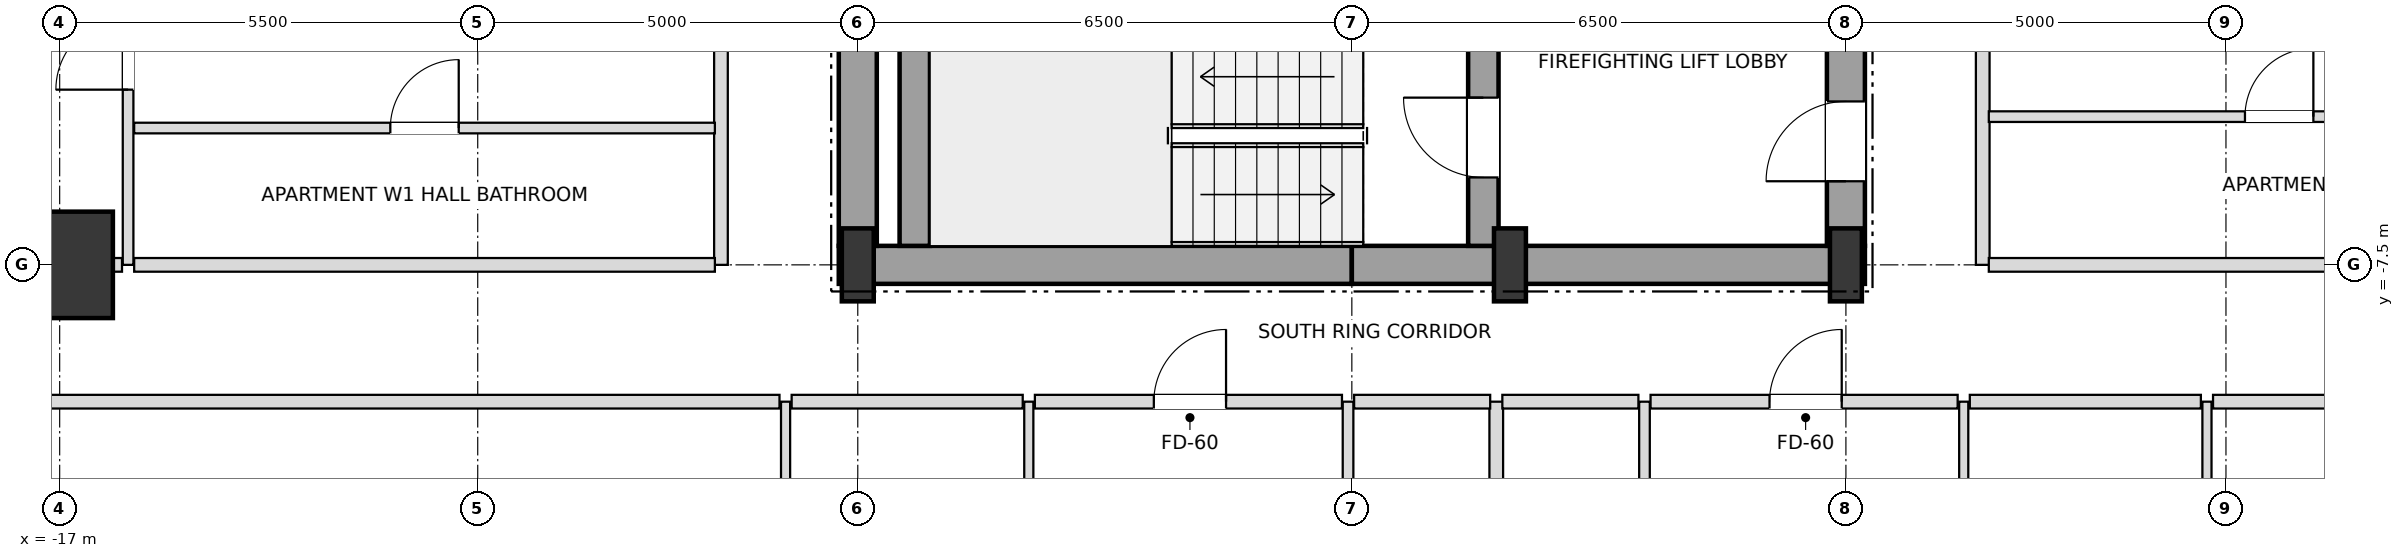
"""IFC4 building model, lengths in metres.
Left out: names, types, materials, properties, quantities, classifications, styles, units other than length and angle.
Written with IfcOpenShell. Run it as: python <this file> out.ifc"""

import sys

from ifc_helpers import new_model, si_unit, direction, frame, frame_2d, origin, origin_2d, place, context, subcontext, project, spatial, rectangle, i_section, extrude, element, fill, save


model = new_model("IFC4")
c1 = context("Model", 3, precision=1e-05, world=origin(), true_north=direction((0.0, 1.0)))
c2 = subcontext(c1, "Body", "Model", "MODEL_VIEW")
j1 = project(units=[si_unit("LENGTHUNIT", "METRE"), si_unit("PLANEANGLEUNIT", "RADIAN")], contexts=[c1])
p1 = place(None, origin())
s1 = spatial("IfcSite", under=j1, at=p1, CompositionType="ELEMENT")
p2 = place(p1, origin())
s2 = spatial("IfcBuilding", under=s1, at=p2, CompositionType="ELEMENT")
p3 = place(p2, frame((0.0, 0.0, 54.0)))
s3 = spatial("IfcBuildingStorey", under=s2, at=p3, CompositionType="ELEMENT", Elevation=54.0)
for number, where, z_axis, x_axis in (
    (1, (-6.5, -7.5, 0.0), (0.0, 0.0, 1.0), (1.0, 0.0, 0.0)),
    (2, (2.08, -7.5, 0.0), (0.0, 0.0, 1.0), (1.0, 0.0, 0.0)),
    (3, (6.5, -7.5, 0.0), (0.0, 0.0, 1.0), (1.0, 0.0, 0.0)),
):
    element("IfcColumn", number, at=place(p3, frame(where, z_axis=z_axis, x_axis=x_axis)), inside=s3, PredefinedType="COLUMN", context=c2, shape_type="SweptSolid", body=[
        extrude(i_section(OverallWidth=0.42, OverallDepth=0.96, WebThickness=0.022, FlangeThickness=0.034, at=origin_2d()), origin(), (0.0, 0.0, 1.0), 3.6),
    ])
p4 = place(p3, frame((-17.0, -7.5, 0.0), z_axis=(0.0, 0.0, 1.0), x_axis=(1.0, 0.0, 0.0)))
e4 = element("IfcColumn", 4, at=p4, inside=s3, PredefinedType="USERDEFINED", context=c2, shape_type="SweptSolid", body=[
    extrude(rectangle(XDim=1.4, YDim=1.4, at=origin_2d()), origin(), (0.0, 0.0, 1.0), 3.6),
])
for number, where, z_axis, x_axis in (
    (5, (-6.75, -7.5, 0.0), (0.0, 0.0, 1.0), (1.0, 0.0, 0.0)),
    (6, (0.0, -7.5, 0.0), (0.0, 0.0, 1.0), (1.0, 0.0, 0.0)),
):
    element("IfcWall", number, at=place(p3, frame(where, z_axis=z_axis, x_axis=x_axis)), inside=s3, PredefinedType="SHEAR", context=c2, shape_type="SweptSolid", body=[
        extrude(rectangle(XDim=6.75, YDim=0.5, at=frame_2d((3.375, 0.0))), origin(), (0.0, 0.0, 1.0), 3.38),
    ])
p5 = place(p3, frame((-6.5, -7.25, 0.0), z_axis=(0.0, 0.0, 1.0), x_axis=(0.0, 1.0, 0.0)))
e7 = element("IfcWall", 7, at=p5, inside=s3, PredefinedType="SHEAR", context=c2, shape_type="SweptSolid", body=[
    extrude(rectangle(XDim=3.55, YDim=0.5, at=frame_2d((1.775, 0.0))), origin(), (0.0, 0.0, 1.0), 3.38),
])
p6 = place(p3, frame((6.5, -7.25, 0.0), z_axis=(0.0, 0.0, 1.0), x_axis=(0.0, 1.0, 0.0)))
e8 = element("IfcWall", 8, at=p6, inside=s3, PredefinedType="SHEAR", context=c2, shape_type="SweptSolid", body=[
    extrude(rectangle(XDim=5.75, YDim=0.5, at=frame_2d((2.875, 0.0))), origin(), (0.0, 0.0, 1.0), 3.38),
])
p7 = place(p6, frame((0.85, 0.0, 0.0)))
e9 = element("IfcOpeningElement", 9, at=p7, cuts=e8, PredefinedType="OPENING", context=c2, shape_type="SweptSolid", body=[
    extrude(rectangle(XDim=1.05, YDim=2.15, at=frame_2d((0.525, 1.075))), frame((0.0, 0.26, 0.0), z_axis=(0.0, -1.0, 0.0), x_axis=(1.0, 0.0, 0.0)), (0.0, 0.0, 1.0), 0.52),
])
p8 = place(p3, frame((-5.75, -7.25, 0.0), z_axis=(0.0, 0.0, 1.0), x_axis=(0.0, 1.0, 0.0)))
e10 = element("IfcWall", 10, at=p8, inside=s3, PredefinedType="SHEAR", context=c2, shape_type="SweptSolid", body=[
    extrude(rectangle(XDim=2.9, YDim=0.4, at=frame_2d((1.45, 0.0))), origin(), (0.0, 0.0, 1.0), 3.38),
])
p9 = place(p3, frame((1.73, -7.25, 0.0), z_axis=(0.0, 0.0, 1.0), x_axis=(0.0, 1.0, 0.0)))
e11 = element("IfcWall", 11, at=p9, inside=s3, PredefinedType="SHEAR", context=c2, shape_type="SweptSolid", body=[
    extrude(rectangle(XDim=3.3, YDim=0.4, at=frame_2d((1.65, 0.0))), origin(), (0.0, 0.0, 1.0), 3.38),
])
p10 = place(p9, frame((0.9, 0.0, 0.0)))
e12 = element("IfcOpeningElement", 12, at=p10, cuts=e11, PredefinedType="OPENING", context=c2, shape_type="SweptSolid", body=[
    extrude(rectangle(XDim=1.05, YDim=2.15, at=frame_2d((0.525, 1.075))), frame((0.0, 0.21, 0.0), z_axis=(0.0, -1.0, 0.0), x_axis=(1.0, 0.0, 0.0)), (0.0, 0.0, 1.0), 0.42),
])
p11 = place(p3, frame((-16.1, -7.5, 0.0), z_axis=(0.0, 0.0, 1.0), x_axis=(0.0, 1.0, 0.0)))
e13 = element("IfcWall", 13, at=p11, inside=s3, PredefinedType="PARTITIONING", context=c2, shape_type="SweptSolid", body=[
    extrude(rectangle(XDim=15.0, YDim=0.14, at=frame_2d((7.5, 0.0))), origin(), (0.0, 0.0, 1.0), 3.38),
])
p12 = place(p11, frame((2.305, 0.0, 0.0)))
e14 = element("IfcOpeningElement", 14, at=p12, cuts=e13, PredefinedType="OPENING", context=c2, shape_type="SweptSolid", body=[
    extrude(rectangle(XDim=0.95, YDim=2.1, at=frame_2d((0.475, 1.05))), frame((0.0, 0.08, 0.0), z_axis=(0.0, -1.0, 0.0), x_axis=(1.0, 0.0, 0.0)), (0.0, 0.0, 1.0), 0.16),
])
p13 = place(p11, frame((10.795, 0.0, 0.0)))
e15 = element("IfcOpeningElement", 15, at=p13, cuts=e13, PredefinedType="OPENING", context=c2, shape_type="SweptSolid", body=[
    extrude(rectangle(XDim=0.95, YDim=2.1, at=frame_2d((0.475, 1.05))), frame((0.0, 0.08, 0.0), z_axis=(0.0, -1.0, 0.0), x_axis=(1.0, 0.0, 0.0)), (0.0, 0.0, 1.0), 0.16),
])
p14 = place(p3, frame((-8.3, -7.5, 0.0), z_axis=(0.0, 0.0, 1.0), x_axis=(0.0, 1.0, 0.0)))
e16 = element("IfcWall", 16, at=p14, inside=s3, PredefinedType="PARTITIONING", context=c2, shape_type="SweptSolid", body=[
    extrude(rectangle(XDim=15.0, YDim=0.18, at=frame_2d((7.5, 0.0))), origin(), (0.0, 0.0, 1.0), 3.38),
])
p15 = place(p14, frame((3.565, 0.0, 0.0)))
e17 = element("IfcOpeningElement", 17, at=p15, cuts=e16, PredefinedType="OPENING", context=c2, shape_type="SweptSolid", body=[
    extrude(rectangle(XDim=0.95, YDim=2.15, at=frame_2d((0.475, 1.075))), frame((0.0, 0.1, 0.0), z_axis=(0.0, -1.0, 0.0), x_axis=(1.0, 0.0, 0.0)), (0.0, 0.0, 1.0), 0.2),
])
p16 = place(p14, frame((11.145, 0.0, 0.0)))
e18 = element("IfcOpeningElement", 18, at=p16, cuts=e16, PredefinedType="OPENING", context=c2, shape_type="SweptSolid", body=[
    extrude(rectangle(XDim=0.95, YDim=2.15, at=frame_2d((0.475, 1.075))), frame((0.0, 0.1, 0.0), z_axis=(0.0, -1.0, 0.0), x_axis=(1.0, 0.0, 0.0)), (0.0, 0.0, 1.0), 0.2),
])
p17 = place(p3, frame((-7.45, -18.9, 0.0), z_axis=(0.0, 0.0, 1.0), x_axis=(0.0, 1.0, 0.0)))
e19 = element("IfcWall", 19, at=p17, inside=s3, PredefinedType="PARTITIONING", context=c2, shape_type="SweptSolid", body=[
    extrude(rectangle(XDim=9.6, YDim=0.12, at=frame_2d((4.8, 0.0))), origin(), (0.0, 0.0, 1.0), 2.816),
])
p18 = place(p17, frame((4.35, 0.0, 0.0)))
e20 = element("IfcOpeningElement", 20, at=p18, cuts=e19, PredefinedType="OPENING", context=c2, shape_type="SweptSolid", body=[
    extrude(rectangle(XDim=0.9, YDim=2.1, at=frame_2d((0.45, 1.05))), frame((0.0, 0.07, 0.0), z_axis=(0.0, -1.0, 0.0), x_axis=(1.0, 0.0, 0.0)), (0.0, 0.0, 1.0), 0.14),
])
p19 = place(p3, frame((-4.25, -24.9, 0.0), z_axis=(0.0, 0.0, 1.0), x_axis=(0.0, 1.0, 0.0)))
e21 = element("IfcWall", 21, at=p19, inside=s3, PredefinedType="PARTITIONING", context=c2, shape_type="SweptSolid", body=[
    extrude(rectangle(XDim=15.6, YDim=0.12, at=frame_2d((7.8, 0.0))), origin(), (0.0, 0.0, 1.0), 2.816),
])
p20 = place(p19, frame((10.325, 0.0, 0.0)))
e22 = element("IfcOpeningElement", 22, at=p20, cuts=e21, PredefinedType="OPENING", context=c2, shape_type="SweptSolid", body=[
    extrude(rectangle(XDim=0.95, YDim=2.1, at=frame_2d((0.475, 1.05))), frame((0.0, 0.07, 0.0), z_axis=(0.0, -1.0, 0.0), x_axis=(1.0, 0.0, 0.0)), (0.0, 0.0, 1.0), 0.14),
])
p21 = place(p19, frame((2.55, 0.0, 0.0)))
e23 = element("IfcOpeningElement", 23, at=p21, cuts=e21, PredefinedType="OPENING", context=c2, shape_type="SweptSolid", body=[
    extrude(rectangle(XDim=0.9, YDim=2.1, at=frame_2d((0.45, 1.05))), frame((0.0, 0.07, 0.0), z_axis=(0.0, -1.0, 0.0), x_axis=(1.0, 0.0, 0.0)), (0.0, 0.0, 1.0), 0.14),
])
p22 = place(p3, frame((-0.05, -18.9, 0.0), z_axis=(0.0, 0.0, 1.0), x_axis=(0.0, 1.0, 0.0)))
e24 = element("IfcWall", 24, at=p22, inside=s3, PredefinedType="PARTITIONING", context=c2, shape_type="SweptSolid", body=[
    extrude(rectangle(XDim=9.6, YDim=0.14, at=frame_2d((4.8, 0.0))), origin(), (0.0, 0.0, 1.0), 2.948),
])
p23 = place(p22, frame((4.35, 0.0, 0.0)))
e25 = element("IfcOpeningElement", 25, at=p23, cuts=e24, PredefinedType="OPENING", context=c2, shape_type="SweptSolid", body=[
    extrude(rectangle(XDim=0.9, YDim=2.1, at=frame_2d((0.45, 1.05))), frame((0.0, 0.08, 0.0), z_axis=(0.0, -1.0, 0.0), x_axis=(1.0, 0.0, 0.0)), (0.0, 0.0, 1.0), 0.16),
])
p24 = place(p3, frame((1.9, -24.9, 0.0), z_axis=(0.0, 0.0, 1.0), x_axis=(0.0, 1.0, 0.0)))
e26 = element("IfcWall", 26, at=p24, inside=s3, PredefinedType="PARTITIONING", context=c2, shape_type="SweptSolid", body=[
    extrude(rectangle(XDim=15.6, YDim=0.18, at=frame_2d((7.8, 0.0))), origin(), (0.0, 0.0, 1.0), 2.816),
])
p25 = place(p3, frame((3.85, -18.9, 0.0), z_axis=(0.0, 0.0, 1.0), x_axis=(0.0, 1.0, 0.0)))
e27 = element("IfcWall", 27, at=p25, inside=s3, PredefinedType="PARTITIONING", context=c2, shape_type="SweptSolid", body=[
    extrude(rectangle(XDim=9.6, YDim=0.14, at=frame_2d((4.8, 0.0))), origin(), (0.0, 0.0, 1.0), 2.948),
])
p26 = place(p25, frame((4.35, 0.0, 0.0)))
e28 = element("IfcOpeningElement", 28, at=p26, cuts=e27, PredefinedType="OPENING", context=c2, shape_type="SweptSolid", body=[
    extrude(rectangle(XDim=0.9, YDim=2.1, at=frame_2d((0.45, 1.05))), frame((0.0, 0.08, 0.0), z_axis=(0.0, -1.0, 0.0), x_axis=(1.0, 0.0, 0.0)), (0.0, 0.0, 1.0), 0.16),
])
p27 = place(p3, frame((8.05, -24.9, 0.0), z_axis=(0.0, 0.0, 1.0), x_axis=(0.0, 1.0, 0.0)))
e29 = element("IfcWall", 29, at=p27, inside=s3, PredefinedType="PARTITIONING", context=c2, shape_type="SweptSolid", body=[
    extrude(rectangle(XDim=15.6, YDim=0.12, at=frame_2d((7.8, 0.0))), origin(), (0.0, 0.0, 1.0), 2.816),
])
p28 = place(p27, frame((10.325, 0.0, 0.0)))
e30 = element("IfcOpeningElement", 30, at=p28, cuts=e29, PredefinedType="OPENING", context=c2, shape_type="SweptSolid", body=[
    extrude(rectangle(XDim=0.95, YDim=2.1, at=frame_2d((0.475, 1.05))), frame((0.0, 0.07, 0.0), z_axis=(0.0, -1.0, 0.0), x_axis=(1.0, 0.0, 0.0)), (0.0, 0.0, 1.0), 0.14),
])
p29 = place(p27, frame((2.55, 0.0, 0.0)))
e31 = element("IfcOpeningElement", 31, at=p29, cuts=e29, PredefinedType="OPENING", context=c2, shape_type="SweptSolid", body=[
    extrude(rectangle(XDim=0.9, YDim=2.1, at=frame_2d((0.45, 1.05))), frame((0.0, 0.07, 0.0), z_axis=(0.0, -1.0, 0.0), x_axis=(1.0, 0.0, 0.0)), (0.0, 0.0, 1.0), 0.14),
])
p30 = place(p3, frame((8.3, -7.5, 0.0), z_axis=(0.0, 0.0, 1.0), x_axis=(0.0, 1.0, 0.0)))
e32 = element("IfcWall", 32, at=p30, inside=s3, PredefinedType="PARTITIONING", context=c2, shape_type="SweptSolid", body=[
    extrude(rectangle(XDim=15.0, YDim=0.18, at=frame_2d((7.5, 0.0))), origin(), (0.0, 0.0, 1.0), 3.38),
])
p31 = place(p30, frame((3.475, 0.0, 0.0)))
e33 = element("IfcOpeningElement", 33, at=p31, cuts=e32, PredefinedType="OPENING", context=c2, shape_type="SweptSolid", body=[
    extrude(rectangle(XDim=0.95, YDim=2.15, at=frame_2d((0.475, 1.075))), frame((0.0, 0.1, 0.0), z_axis=(0.0, -1.0, 0.0), x_axis=(1.0, 0.0, 0.0)), (0.0, 0.0, 1.0), 0.2),
])
p32 = place(p3, frame((11.25, -18.9, 0.0), z_axis=(0.0, 0.0, 1.0), x_axis=(0.0, 1.0, 0.0)))
e34 = element("IfcWall", 34, at=p32, inside=s3, PredefinedType="PARTITIONING", context=c2, shape_type="SweptSolid", body=[
    extrude(rectangle(XDim=9.6, YDim=0.12, at=frame_2d((4.8, 0.0))), origin(), (0.0, 0.0, 1.0), 2.736),
])
p33 = place(p32, frame((4.325, 0.0, 0.0)))
e35 = element("IfcOpeningElement", 35, at=p33, cuts=e34, PredefinedType="OPENING", context=c2, shape_type="SweptSolid", body=[
    extrude(rectangle(XDim=0.95, YDim=2.1, at=frame_2d((0.475, 1.05))), frame((0.0, 0.07, 0.0), z_axis=(0.0, -1.0, 0.0), x_axis=(1.0, 0.0, 0.0)), (0.0, 0.0, 1.0), 0.14),
])
p34 = place(p3, frame((-18.32, -9.3, 0.0), z_axis=(0.0, 0.0, 1.0), x_axis=(1.0, 0.0, 0.0)))
e36 = element("IfcWall", 36, at=p34, inside=s3, PredefinedType="PARTITIONING", context=c2, shape_type="SweptSolid", body=[
    extrude(rectangle(XDim=10.79, YDim=0.18, at=frame_2d((5.395, 0.0))), origin(), (0.0, 0.0, 1.0), 2.816),
])
p35 = place(p3, frame((-7.37, -9.3, 0.0), z_axis=(0.0, 0.0, 1.0), x_axis=(1.0, 0.0, 0.0)))
e37 = element("IfcWall", 37, at=p35, inside=s3, PredefinedType="PARTITIONING", context=c2, shape_type="SweptSolid", body=[
    extrude(rectangle(XDim=3.04, YDim=0.18, at=frame_2d((1.52, 0.0))), origin(), (0.0, 0.0, 1.0), 2.816),
])
p36 = place(p3, frame((-4.17, -9.3, 0.0), z_axis=(0.0, 0.0, 1.0), x_axis=(1.0, 0.0, 0.0)))
e38 = element("IfcWall", 38, at=p36, inside=s3, PredefinedType="PARTITIONING", context=c2, shape_type="SweptSolid", body=[
    extrude(rectangle(XDim=4.04, YDim=0.18, at=frame_2d((2.02, 0.0))), origin(), (0.0, 0.0, 1.0), 3.38),
])
p37 = place(p36, frame((1.565, 0.0, 0.0)))
e39 = element("IfcOpeningElement", 39, at=p37, cuts=e38, PredefinedType="OPENING", context=c2, shape_type="SweptSolid", body=[
    extrude(rectangle(XDim=0.95, YDim=2.15, at=frame_2d((0.475, 1.075))), frame((0.0, 0.1, 0.0), z_axis=(0.0, -1.0, 0.0), x_axis=(1.0, 0.0, 0.0)), (0.0, 0.0, 1.0), 0.2),
])
for number, where, z_axis, x_axis in (
    (40, (0.03, -9.3, 0.0), (0.0, 0.0, 1.0), (1.0, 0.0, 0.0)),
    (41, (1.98, -9.3, 0.0), (0.0, 0.0, 1.0), (1.0, 0.0, 0.0)),
):
    element("IfcWall", number, at=place(p3, frame(where, z_axis=z_axis, x_axis=x_axis)), inside=s3, PredefinedType="PARTITIONING", context=c2, shape_type="SweptSolid", body=[
        extrude(rectangle(XDim=1.79, YDim=0.18, at=frame_2d((0.895, 0.0))), origin(), (0.0, 0.0, 1.0), 3.38),
    ])
p38 = place(p3, frame((3.93, -9.3, 0.0), z_axis=(0.0, 0.0, 1.0), x_axis=(1.0, 0.0, 0.0)))
e42 = element("IfcWall", 42, at=p38, inside=s3, PredefinedType="PARTITIONING", context=c2, shape_type="SweptSolid", body=[
    extrude(rectangle(XDim=4.04, YDim=0.18, at=frame_2d((2.02, 0.0))), origin(), (0.0, 0.0, 1.0), 2.816),
])
p39 = place(p38, frame((1.565, 0.0, 0.0)))
e43 = element("IfcOpeningElement", 43, at=p39, cuts=e42, PredefinedType="OPENING", context=c2, shape_type="SweptSolid", body=[
    extrude(rectangle(XDim=0.95, YDim=2.15, at=frame_2d((0.475, 1.075))), frame((0.0, 0.1, 0.0), z_axis=(0.0, -1.0, 0.0), x_axis=(1.0, 0.0, 0.0)), (0.0, 0.0, 1.0), 0.2),
])
p40 = place(p3, frame((8.13, -9.3, 0.0), z_axis=(0.0, 0.0, 1.0), x_axis=(1.0, 0.0, 0.0)))
e44 = element("IfcWall", 44, at=p40, inside=s3, PredefinedType="PARTITIONING", context=c2, shape_type="SweptSolid", body=[
    extrude(rectangle(XDim=3.04, YDim=0.18, at=frame_2d((1.52, 0.0))), origin(), (0.0, 0.0, 1.0), 3.38),
])
p41 = place(p3, frame((11.33, -9.3, 0.0), z_axis=(0.0, 0.0, 1.0), x_axis=(1.0, 0.0, 0.0)))
e45 = element("IfcWall", 45, at=p41, inside=s3, PredefinedType="PARTITIONING", context=c2, shape_type="SweptSolid", body=[
    extrude(rectangle(XDim=6.99, YDim=0.18, at=frame_2d((3.495, 0.0))), origin(), (0.0, 0.0, 1.0), 2.816),
])
p42 = place(p3, frame((-21.9, -7.5, 0.0), z_axis=(0.0, 0.0, 1.0), x_axis=(1.0, 0.0, 0.0)))
e46 = element("IfcWall", 46, at=p42, inside=s3, PredefinedType="PARTITIONING", context=c2, shape_type="SweptSolid", body=[
    extrude(rectangle(XDim=5.72, YDim=0.18, at=frame_2d((2.86, 0.0))), origin(), (0.0, 0.0, 1.0), 2.816),
])
for number, where, z_axis, x_axis in (
    (47, (-16.02, -7.5, 0.0), (0.0, 0.0, 1.0), (1.0, 0.0, 0.0)),
    (48, (8.38, -7.5, 0.0), (0.0, 0.0, 1.0), (1.0, 0.0, 0.0)),
):
    element("IfcWall", number, at=place(p3, frame(where, z_axis=z_axis, x_axis=x_axis)), inside=s3, PredefinedType="PARTITIONING", context=c2, shape_type="SweptSolid", body=[
        extrude(rectangle(XDim=7.64, YDim=0.18, at=frame_2d((3.82, 0.0))), origin(), (0.0, 0.0, 1.0), 2.816),
    ])
p43 = place(p3, frame((-16.02, -5.7, 0.0), z_axis=(0.0, 0.0, 1.0), x_axis=(1.0, 0.0, 0.0)))
e49 = element("IfcWall", 49, at=p43, inside=s3, PredefinedType="PARTITIONING", context=c2, shape_type="SweptSolid", body=[
    extrude(rectangle(XDim=7.64, YDim=0.14, at=frame_2d((3.82, 0.0))), origin(), (0.0, 0.0, 1.0), 2.948),
])
p44 = place(p43, frame((3.37, 0.0, 0.0)))
e50 = element("IfcOpeningElement", 50, at=p44, cuts=e49, PredefinedType="OPENING", context=c2, shape_type="SweptSolid", body=[
    extrude(rectangle(XDim=0.9, YDim=2.1, at=frame_2d((0.45, 1.05))), frame((0.0, 0.08, 0.0), z_axis=(0.0, -1.0, 0.0), x_axis=(1.0, 0.0, 0.0)), (0.0, 0.0, 1.0), 0.16),
])
p45 = place(p3, frame((8.38, -5.55, 0.0), z_axis=(0.0, 0.0, 1.0), x_axis=(1.0, 0.0, 0.0)))
e51 = element("IfcWall", 51, at=p45, inside=s3, PredefinedType="PARTITIONING", context=c2, shape_type="SweptSolid", body=[
    extrude(rectangle(XDim=7.64, YDim=0.14, at=frame_2d((3.82, 0.0))), origin(), (0.0, 0.0, 1.0), 2.948),
])
p46 = place(p45, frame((3.37, 0.0, 0.0)))
e52 = element("IfcOpeningElement", 52, at=p46, cuts=e51, PredefinedType="OPENING", context=c2, shape_type="SweptSolid", body=[
    extrude(rectangle(XDim=0.9, YDim=2.1, at=frame_2d((0.45, 1.05))), frame((0.0, 0.08, 0.0), z_axis=(0.0, -1.0, 0.0), x_axis=(1.0, 0.0, 0.0)), (0.0, 0.0, 1.0), 0.16),
])
p47 = place(p7, origin())
e53 = element("IfcDoor", 53, at=p47, inside=s3, OperationType="SINGLE_SWING_LEFT", PredefinedType="DOOR", context=c2, shape_type="SweptSolid", body=[
    extrude(rectangle(XDim=1.05, YDim=2.15, at=frame_2d((0.525, 1.075))), frame((0.0, 0.025, 0.0), z_axis=(0.0, -1.0, 0.0), x_axis=(1.0, 0.0, 0.0)), (0.0, 0.0, 1.0), 0.05),
])
fill(e9, e53)
p48 = place(p10, origin())
e54 = element("IfcDoor", 54, at=p48, inside=s3, OperationType="SINGLE_SWING_RIGHT", PredefinedType="DOOR", context=c2, shape_type="SweptSolid", body=[
    extrude(rectangle(XDim=1.05, YDim=2.15, at=frame_2d((0.525, 1.075))), frame((0.0, 0.025, 0.0), z_axis=(0.0, -1.0, 0.0), x_axis=(1.0, 0.0, 0.0)), (0.0, 0.0, 1.0), 0.05),
])
fill(e12, e54)
p49 = place(p37, origin())
e55 = element("IfcDoor", 55, at=p49, inside=s3, OperationType="SINGLE_SWING_RIGHT", PredefinedType="DOOR", context=c2, shape_type="SweptSolid", body=[
    extrude(rectangle(XDim=0.95, YDim=2.15, at=frame_2d((0.475, 1.075))), frame((0.0, 0.025, 0.0), z_axis=(0.0, -1.0, 0.0), x_axis=(1.0, 0.0, 0.0)), (0.0, 0.0, 1.0), 0.05),
])
fill(e39, e55)
p50 = place(p39, origin())
e56 = element("IfcDoor", 56, at=p50, inside=s3, OperationType="SINGLE_SWING_RIGHT", PredefinedType="DOOR", context=c2, shape_type="SweptSolid", body=[
    extrude(rectangle(XDim=0.95, YDim=2.15, at=frame_2d((0.475, 1.075))), frame((0.0, 0.025, 0.0), z_axis=(0.0, -1.0, 0.0), x_axis=(1.0, 0.0, 0.0)), (0.0, 0.0, 1.0), 0.05),
])
fill(e43, e56)
p51 = place(p44, origin())
e57 = element("IfcDoor", 57, at=p51, inside=s3, OperationType="SINGLE_SWING_RIGHT", PredefinedType="DOOR", context=c2, shape_type="SweptSolid", body=[
    extrude(rectangle(XDim=0.9, YDim=2.1, at=frame_2d((0.45, 1.05))), frame((0.0, 0.025, 0.0), z_axis=(0.0, -1.0, 0.0), x_axis=(1.0, 0.0, 0.0)), (0.0, 0.0, 1.0), 0.05),
])
fill(e50, e57)
p52 = place(p12, origin())
e58 = element("IfcDoor", 58, at=p52, inside=s3, OperationType="SINGLE_SWING_LEFT", PredefinedType="DOOR", context=c2, shape_type="SweptSolid", body=[
    extrude(rectangle(XDim=0.95, YDim=2.1, at=frame_2d((0.475, 1.05))), frame((0.0, 0.025, 0.0), z_axis=(0.0, -1.0, 0.0), x_axis=(1.0, 0.0, 0.0)), (0.0, 0.0, 1.0), 0.05),
])
fill(e14, e58)
p53 = place(p46, origin())
e59 = element("IfcDoor", 59, at=p53, inside=s3, OperationType="SINGLE_SWING_RIGHT", PredefinedType="DOOR", context=c2, shape_type="SweptSolid", body=[
    extrude(rectangle(XDim=0.9, YDim=2.1, at=frame_2d((0.45, 1.05))), frame((0.0, 0.025, 0.0), z_axis=(0.0, -1.0, 0.0), x_axis=(1.0, 0.0, 0.0)), (0.0, 0.0, 1.0), 0.05),
])
fill(e52, e59)
save(model, sys.argv[1])
